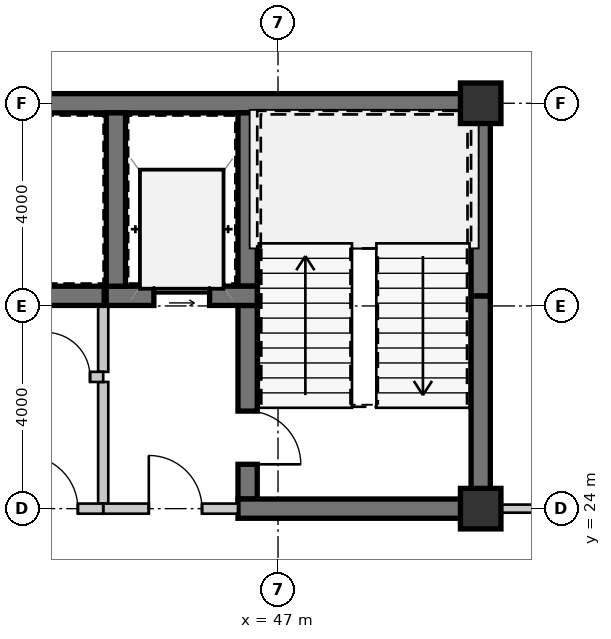
"""IFC4 building model, lengths in metres.
Left out: names, types, materials, properties, quantities, classifications, styles, units other than length and angle.
Written with IfcOpenShell. Run it as: python <this file> out.ifc"""

import sys

from ifc_helpers import new_model, si_unit, direction, frame, frame_2d, origin, origin_2d, place, context, subcontext, project, spatial, rectangle, extrude, source, transform, mapped, element, fill, save


model = new_model("IFC4")
c1 = context("Model", 3, precision=1e-05, world=origin(), true_north=direction((0.0, 1.0)))
c2 = subcontext(c1, "Body", "Model", "MODEL_VIEW")
j1 = project(units=[si_unit("LENGTHUNIT", "METRE"), si_unit("PLANEANGLEUNIT", "RADIAN")], contexts=[c1])
p1 = place(None, origin())
s1 = spatial("IfcSite", under=j1, at=p1, CompositionType="ELEMENT")
p2 = place(p1, origin())
s2 = spatial("IfcBuilding", under=s1, at=p2, CompositionType="ELEMENT")
p3 = place(p2, frame((0.0, 0.0, 45.15)))
s3 = spatial("IfcBuildingStorey", under=s2, at=p3, CompositionType="ELEMENT", Elevation=45.15)
m1 = source(origin(), c2, "Body", "SweptSolid", [
    extrude(rectangle(XDim=0.8, YDim=0.8, at=origin_2d()), origin(), (0.0, 0.0, 1.0), 3.15),
])
for number, where, z_axis, x_axis in (
    (1, (51.0, 24.0, 0.0), (0.0, 0.0, 1.0), (1.0, 0.0, 0.0)),
    (2, (51.0, 32.0, 0.0), (0.0, 0.0, 1.0), (1.0, 0.0, 0.0)),
):
    element("IfcColumn", number, at=place(p3, frame(where, z_axis=z_axis, x_axis=x_axis)), inside=s3, PredefinedType="COLUMN", context=c2, shape_type="MappedRepresentation", body=[
        mapped(m1, transform((0.0, 0.0, 0.0), scale=1.0)),
    ])
m2 = source(origin(), c2, "Body", "SweptSolid", [
    extrude(rectangle(XDim=11.99, YDim=0.38, at=frame_2d((5.995, 0.0))), origin(), (0.0, 0.0, 1.0), 2.93),
])
p4 = place(p3, frame((39.2, 32.0, 0.0), z_axis=(0.0, 0.0, 1.0), x_axis=(1.0, 0.0, 0.0)))
e3 = element("IfcWall", 3, at=p4, inside=s3, PredefinedType="SHEAR", context=c2, shape_type="MappedRepresentation", body=[
    mapped(m2, transform((0.0, 0.0, 0.0), scale=1.0)),
])
m3 = source(origin(), c2, "Body", "SweptSolid", [
    extrude(rectangle(XDim=4.01, YDim=0.38, at=frame_2d((2.005, 0.0))), origin(), (0.0, 0.0, 1.0), 2.93),
])
p5 = place(p3, frame((51.0, 24.19, 0.0), z_axis=(0.0, 0.0, 1.0), x_axis=(0.0, 1.0, 0.0)))
e4 = element("IfcWall", 4, at=p5, inside=s3, PredefinedType="SHEAR", context=c2, shape_type="MappedRepresentation", body=[
    mapped(m3, transform((0.0, 0.0, 0.0), scale=1.0)),
])
m4 = source(origin(), c2, "Body", "SweptSolid", [
    extrude(rectangle(XDim=3.61, YDim=0.38, at=frame_2d((1.805, 0.0))), origin(), (0.0, 0.0, 1.0), 2.93),
])
p6 = place(p3, frame((51.0, 28.2, 0.0), z_axis=(0.0, 0.0, 1.0), x_axis=(0.0, 1.0, 0.0)))
e5 = element("IfcWall", 5, at=p6, inside=s3, PredefinedType="SHEAR", context=c2, shape_type="MappedRepresentation", body=[
    mapped(m4, transform((0.0, 0.0, 0.0), scale=1.0)),
])
m5 = source(origin(), c2, "Body", "SweptSolid", [
    extrude(rectangle(XDim=3.42, YDim=0.38, at=frame_2d((1.71, 0.0))), origin(), (0.0, 0.0, 1.0), 2.93),
])
p7 = place(p3, frame((46.4, 31.81, 0.0), z_axis=(0.0, 0.0, 1.0), x_axis=(0.0, -1.0, 0.0)))
e6 = element("IfcWall", 6, at=p7, inside=s3, PredefinedType="SHEAR", context=c2, shape_type="MappedRepresentation", body=[
    mapped(m5, transform((0.0, 0.0, 0.0), scale=1.0)),
])
m6 = source(origin(), c2, "Body", "SweptSolid", [
    extrude(rectangle(XDim=3.82, YDim=0.38, at=frame_2d((1.91, 0.0))), origin(), (0.0, 0.0, 1.0), 2.93),
])
p8 = place(p3, frame((46.4, 28.01, 0.0), z_axis=(0.0, 0.0, 1.0), x_axis=(0.0, -1.0, 0.0)))
e7 = element("IfcWall", 7, at=p8, inside=s3, PredefinedType="SHEAR", context=c2, shape_type="MappedRepresentation", body=[
    mapped(m6, transform((0.0, 0.0, 0.0), scale=1.0)),
])
m7 = source(origin(), c2, "Body", "SweptSolid", [
    extrude(rectangle(XDim=1.05, YDim=2.1, at=frame_2d((0.525, 1.05))), frame((0.0, 0.2, 0.0), z_axis=(0.0, -1.0, 0.0), x_axis=(1.0, 0.0, 0.0)), (0.0, 0.0, 1.0), 0.4),
])
p9 = place(p8, frame((2.085, 0.0, 0.0)))
e8 = element("IfcOpeningElement", 8, at=p9, cuts=e7, PredefinedType="OPENING", context=c2, shape_type="MappedRepresentation", body=[
    mapped(m7, transform((0.0, 0.0, 0.0), scale=1.0)),
])
m8 = source(origin(), c2, "Body", "SweptSolid", [
    extrude(rectangle(XDim=4.98, YDim=0.38, at=frame_2d((2.49, 0.0))), origin(), (0.0, 0.0, 1.0), 2.93),
])
p10 = place(p3, frame((46.21, 24.0, 0.0), z_axis=(0.0, 0.0, 1.0), x_axis=(1.0, 0.0, 0.0)))
e9 = element("IfcWall", 9, at=p10, inside=s3, PredefinedType="SHEAR", context=c2, shape_type="MappedRepresentation", body=[
    mapped(m8, transform((0.0, 0.0, 0.0), scale=1.0)),
])
m9 = source(origin(), c2, "Body", "SweptSolid", [
    extrude(rectangle(XDim=2.98, YDim=0.38, at=frame_2d((1.49, 0.0))), origin(), (0.0, 0.0, 1.0), 2.93),
])
p11 = place(p3, frame((43.61, 28.2, 0.0), z_axis=(0.0, 0.0, 1.0), x_axis=(1.0, 0.0, 0.0)))
e10 = element("IfcWall", 10, at=p11, inside=s3, PredefinedType="SHEAR", context=c2, shape_type="MappedRepresentation", body=[
    mapped(m9, transform((0.0, 0.0, 0.0), scale=1.0)),
])
m10 = source(origin(), c2, "Body", "SweptSolid", [
    extrude(rectangle(XDim=1.1, YDim=2.15, at=frame_2d((0.55, 1.075))), frame((0.0, 0.2, 0.0), z_axis=(0.0, -1.0, 0.0), x_axis=(1.0, 0.0, 0.0)), (0.0, 0.0, 1.0), 0.4),
])
p12 = place(p11, frame((0.94, 0.0, 0.0)))
e11 = element("IfcOpeningElement", 11, at=p12, cuts=e10, PredefinedType="OPENING", context=c2, shape_type="MappedRepresentation", body=[
    mapped(m10, transform((0.0, 0.0, 0.0), scale=1.0)),
])
p13 = place(p3, frame((43.8, 31.81, 0.0), z_axis=(0.0, 0.0, 1.0), x_axis=(0.0, -1.0, 0.0)))
e12 = element("IfcWall", 12, at=p13, inside=s3, PredefinedType="SHEAR", context=c2, shape_type="MappedRepresentation", body=[
    mapped(m5, transform((0.0, 0.0, 0.0), scale=1.0)),
])
m11 = source(origin(), c2, "Body", "SweptSolid", [
    extrude(rectangle(XDim=2.4, YDim=0.2, at=frame_2d((1.2, 0.0))), origin(), (0.0, 0.0, 1.0), 2.93),
])
p14 = place(p3, frame((43.55, 26.5, 0.0), z_axis=(0.0, 0.0, 1.0), x_axis=(0.0, -1.0, 0.0)))
e13 = element("IfcWall", 13, at=p14, inside=s3, PredefinedType="SOLIDWALL", context=c2, shape_type="MappedRepresentation", body=[
    mapped(m11, transform((0.0, 0.0, 0.0), scale=1.0)),
])
m12 = source(origin(), c2, "Body", "SweptSolid", [
    extrude(rectangle(XDim=1.31, YDim=0.2, at=frame_2d((0.655, 0.0))), origin(), (0.0, 0.0, 1.0), 2.93),
])
p15 = place(p3, frame((43.55, 28.01, 0.0), z_axis=(0.0, 0.0, 1.0), x_axis=(0.0, -1.0, 0.0)))
e14 = element("IfcWall", 14, at=p15, inside=s3, PredefinedType="SOLIDWALL", context=c2, shape_type="MappedRepresentation", body=[
    mapped(m12, transform((0.0, 0.0, 0.0), scale=1.0)),
])
m13 = source(origin(), c2, "Body", "SweptSolid", [
    extrude(rectangle(XDim=2.66, YDim=0.2, at=frame_2d((1.33, 0.0))), origin(), (0.0, 0.0, 1.0), 2.397),
])
p16 = place(p3, frame((43.55, 24.0, 0.0), z_axis=(0.0, 0.0, 1.0), x_axis=(1.0, 0.0, 0.0)))
e15 = element("IfcWall", 15, at=p16, inside=s3, PredefinedType="SOLIDWALL", context=c2, shape_type="MappedRepresentation", body=[
    mapped(m13, transform((0.0, 0.0, 0.0), scale=1.0)),
])
m14 = source(origin(), c2, "Body", "SweptSolid", [
    extrude(rectangle(XDim=1.05, YDim=2.1, at=frame_2d((0.525, 1.05))), frame((0.0, 0.11, 0.0), z_axis=(0.0, -1.0, 0.0), x_axis=(1.0, 0.0, 0.0)), (0.0, 0.0, 1.0), 0.22),
])
p17 = place(p16, frame((0.9, 0.0, 0.0)))
e16 = element("IfcOpeningElement", 16, at=p17, cuts=e15, PredefinedType="OPENING", context=c2, shape_type="MappedRepresentation", body=[
    mapped(m14, transform((0.0, 0.0, 0.0), scale=1.0)),
])
m15 = source(origin(), c2, "Body", "SweptSolid", [
    extrude(rectangle(XDim=1.44, YDim=0.38, at=frame_2d((0.72, 0.0))), origin(), (0.0, 0.0, 1.0), 2.93),
])
p18 = place(p3, frame((42.13, 28.2, 0.0), z_axis=(0.0, 0.0, 1.0), x_axis=(1.0, 0.0, 0.0)))
e17 = element("IfcWall", 17, at=p18, inside=s3, PredefinedType="SHEAR", context=c2, shape_type="MappedRepresentation", body=[
    mapped(m15, transform((0.0, 0.0, 0.0), scale=1.0)),
])
m16 = source(origin(), c2, "Body", "SweptSolid", [
    extrude(rectangle(XDim=1.25, YDim=0.2, at=frame_2d((0.625, 0.0))), origin(), (0.0, 0.0, 1.0), 2.93),
])
p19 = place(p3, frame((42.3, 26.6, 0.0), z_axis=(0.0, 0.0, 1.0), x_axis=(1.0, 0.0, 0.0)))
e18 = element("IfcWall", 18, at=p19, inside=s3, PredefinedType="SOLIDWALL", context=c2, shape_type="MappedRepresentation", body=[
    mapped(m16, transform((0.0, 0.0, 0.0), scale=1.0)),
])
m17 = source(origin(), c2, "Body", "SweptSolid", [
    extrude(rectangle(XDim=0.88, YDim=2.1, at=frame_2d((0.44, 1.05))), frame((0.0, 0.11, 0.0), z_axis=(0.0, -1.0, 0.0), x_axis=(1.0, 0.0, 0.0)), (0.0, 0.0, 1.0), 0.22),
])
p20 = place(p19, frame((0.11, 0.0, 0.0)))
e19 = element("IfcOpeningElement", 19, at=p20, cuts=e18, PredefinedType="OPENING", context=c2, shape_type="MappedRepresentation", body=[
    mapped(m17, transform((0.0, 0.0, 0.0), scale=1.0)),
])
m18 = source(origin(), c2, "Body", "SweptSolid", [
    extrude(rectangle(XDim=2.05, YDim=0.2, at=frame_2d((1.025, 0.0))), origin(), (0.0, 0.0, 1.0), 2.397),
])
p21 = place(p3, frame((43.55, 24.0, 0.0), z_axis=(0.0, 0.0, 1.0), x_axis=(-1.0, 0.0, 0.0)))
e20 = element("IfcWall", 20, at=p21, inside=s3, PredefinedType="SOLIDWALL", context=c2, shape_type="MappedRepresentation", body=[
    mapped(m18, transform((0.0, 0.0, 0.0), scale=1.0)),
])
p22 = place(p21, frame((0.5, 0.0, 0.0)))
e21 = element("IfcOpeningElement", 21, at=p22, cuts=e20, PredefinedType="OPENING", context=c2, shape_type="MappedRepresentation", body=[
    mapped(m14, transform((0.0, 0.0, 0.0), scale=1.0)),
])
m19 = source(origin(), c2, "Body", "SweptSolid", [
    extrude(rectangle(XDim=4.13, YDim=0.16, at=frame_2d((2.065, 0.0))), origin(), (0.0, 0.0, 1.0), 2.93),
])
p23 = place(p3, frame((51.19, 24.0, 0.0), z_axis=(0.0, 0.0, 1.0), x_axis=(1.0, 0.0, 0.0)))
e22 = element("IfcWall", 22, at=p23, inside=s3, PredefinedType="PARTITIONING", context=c2, shape_type="MappedRepresentation", body=[
    mapped(m19, transform((0.0, 0.0, 0.0), scale=1.0)),
])
m20 = source(origin(), c2, "Body", "SweptSolid", [
    extrude(rectangle(XDim=1.05, YDim=2.1, at=frame_2d((0.525, 1.05))), frame((0.0, 0.025, 0.0), z_axis=(0.0, -1.0, 0.0), x_axis=(1.0, 0.0, 0.0)), (0.0, 0.0, 1.0), 0.05),
])
p24 = place(p9, origin())
e23 = element("IfcDoor", 23, at=p24, inside=s3, OperationType="SINGLE_SWING_RIGHT", PredefinedType="DOOR", context=c2, shape_type="MappedRepresentation", body=[
    mapped(m20, transform((0.0, 0.0, 0.0), scale=1.0)),
])
fill(e8, e23)
m21 = source(origin(), c2, "Body", "SweptSolid", [
    extrude(rectangle(XDim=1.1, YDim=2.15, at=frame_2d((0.55, 1.075))), frame((0.0, 0.025, 0.0), z_axis=(0.0, -1.0, 0.0), x_axis=(1.0, 0.0, 0.0)), (0.0, 0.0, 1.0), 0.05),
])
p25 = place(p12, origin())
e24 = element("IfcDoor", 24, at=p25, inside=s3, OperationType="SLIDING_TO_LEFT", PredefinedType="DOOR", context=c2, shape_type="MappedRepresentation", body=[
    mapped(m21, transform((0.0, 0.0, 0.0), scale=1.0)),
])
fill(e11, e24)
p26 = place(p17, origin())
e25 = element("IfcDoor", 25, at=p26, inside=s3, OperationType="SINGLE_SWING_LEFT", PredefinedType="DOOR", context=c2, shape_type="MappedRepresentation", body=[
    mapped(m20, transform((0.0, 0.0, 0.0), scale=1.0)),
])
fill(e16, e25)
m22 = source(origin(), c2, "Body", "SweptSolid", [
    extrude(rectangle(XDim=0.88, YDim=2.1, at=frame_2d((0.44, 1.05))), frame((0.0, 0.025, 0.0), z_axis=(0.0, -1.0, 0.0), x_axis=(1.0, 0.0, 0.0)), (0.0, 0.0, 1.0), 0.05),
])
p27 = place(p20, origin())
e26 = element("IfcDoor", 26, at=p27, inside=s3, OperationType="SINGLE_SWING_LEFT", PredefinedType="DOOR", context=c2, shape_type="MappedRepresentation", body=[
    mapped(m22, transform((0.0, 0.0, 0.0), scale=1.0)),
])
fill(e19, e26)
p28 = place(p22, frame((1.05, 0.0, 0.0), z_axis=(0.0, 0.0, 1.0), x_axis=(-1.0, 0.0, 0.0)))
e27 = element("IfcDoor", 27, at=p28, inside=s3, OperationType="SINGLE_SWING_LEFT", PredefinedType="DOOR", context=c2, shape_type="MappedRepresentation", body=[
    mapped(m20, transform((0.0, 0.0, 0.0), scale=1.0)),
])
fill(e21, e27)
save(model, sys.argv[1])
